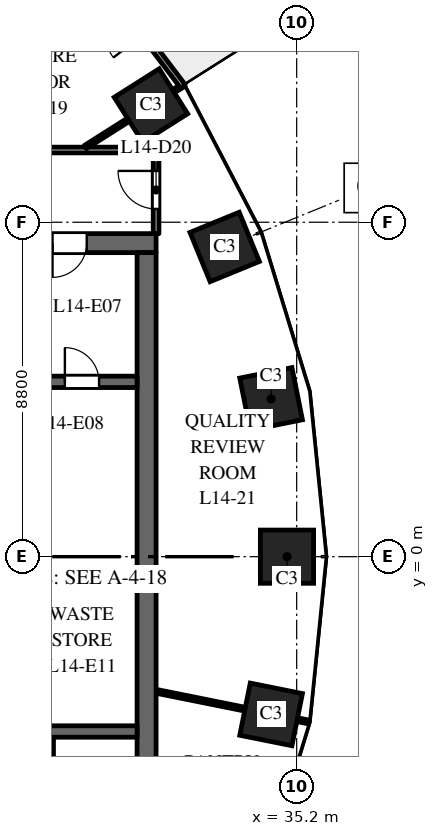
"""IFC4 building model, lengths in metres.
Left out: names, types, materials, properties, quantities, classifications, styles, units other than length and angle.
Written with IfcOpenShell. Run it as: python <this file> out.ifc"""

import sys

from ifc_helpers import new_model, si_unit, direction, frame, frame_2d, origin, origin_2d, place, context, subcontext, project, spatial, rectangle, extrude, element, fill, save


model = new_model("IFC4")
c1 = context("Model", 3, precision=1e-05, world=origin(), true_north=direction((0.0, 1.0)))
c2 = subcontext(c1, "Body", "Model", "MODEL_VIEW")
j1 = project(units=[si_unit("LENGTHUNIT", "METRE"), si_unit("PLANEANGLEUNIT", "RADIAN")], contexts=[c1])
p1 = place(None, origin())
s1 = spatial("IfcSite", under=j1, at=p1, CompositionType="ELEMENT")
p2 = place(p1, origin())
s2 = spatial("IfcBuilding", under=s1, at=p2, CompositionType="ELEMENT")
p3 = place(p2, frame((0.0, 0.0, 66.5)))
s3 = spatial("IfcBuildingStorey", under=s2, at=p3, CompositionType="ELEMENT", Elevation=66.5)
for number, where, z_axis, x_axis in (
    (1, (34.945, 0.0, 0.0), (0.0, 0.0, 1.0), (0.0, 1.0, 0.0)),
    (2, (34.527, 4.151, 0.0), (0.0, 0.0, 1.0), (-0.197, 0.98, 0.0)),
    (3, (33.305, 8.149, 0.0), (0.0, 0.0, 1.0), (-0.379, 0.925, 0.0)),
    (4, (31.365, 11.871, 0.0), (0.0, 0.0, 1.0), (-0.535, 0.845, 0.0)),
    (5, (34.527, -4.151, 0.0), (0.0, 0.0, 1.0), (0.197, 0.98, 0.0)),
):
    element("IfcColumn", number, at=place(p3, frame(where, z_axis=z_axis, x_axis=x_axis)), inside=s3, PredefinedType="COLUMN", context=c2, shape_type="SweptSolid", body=[
        extrude(rectangle(XDim=1.4, YDim=1.4, at=origin_2d()), origin(), (0.0, 0.0, 1.0), 4.0),
    ])
p4 = place(p3, frame((16.5, 8.25, 0.0), z_axis=(0.0, 0.0, 1.0), x_axis=(1.0, 0.0, 0.0)))
e6 = element("IfcWall", 6, at=p4, inside=s3, PredefinedType="SHEAR", context=c2, shape_type="SweptSolid", body=[
    extrude(rectangle(XDim=15.0, YDim=0.5, at=frame_2d((7.5, 0.0))), origin(), (0.0, 0.0, 1.0), 3.7),
])
p5 = place(p4, frame((6.9, 0.0, 0.0)))
e7 = element("IfcOpeningElement", 7, at=p5, cuts=e6, PredefinedType="OPENING", context=c2, shape_type="SweptSolid", body=[
    extrude(rectangle(XDim=1.2, YDim=2.1, at=frame_2d((0.6, 1.05))), frame((0.0, 0.26, 0.0), z_axis=(0.0, -1.0, 0.0), x_axis=(1.0, 0.0, 0.0)), (0.0, 0.0, 1.0), 0.52),
])
p6 = place(p4, frame((12.275, 0.0, 0.0)))
e8 = element("IfcOpeningElement", 8, at=p6, cuts=e6, PredefinedType="OPENING", context=c2, shape_type="SweptSolid", body=[
    extrude(rectangle(XDim=0.9, YDim=2.1, at=frame_2d((0.45, 1.05))), frame((0.0, 0.26, 0.0), z_axis=(0.0, -1.0, 0.0), x_axis=(1.0, 0.0, 0.0)), (0.0, 0.0, 1.0), 0.52),
])
p7 = place(p3, frame((31.25, -8.0, 0.0), z_axis=(0.0, 0.0, 1.0), x_axis=(0.0, 1.0, 0.0)))
e9 = element("IfcWall", 9, at=p7, inside=s3, PredefinedType="SHEAR", context=c2, shape_type="SweptSolid", body=[
    extrude(rectangle(XDim=16.0, YDim=0.5, at=frame_2d((8.0, 0.0))), origin(), (0.0, 0.0, 1.0), 3.7),
])
p8 = place(p3, frame((24.9, 4.6, 0.0), z_axis=(0.0, 0.0, 1.0), x_axis=(1.0, 0.0, 0.0)))
e10 = element("IfcWall", 10, at=p8, inside=s3, PredefinedType="SHEAR", context=c2, shape_type="SweptSolid", body=[
    extrude(rectangle(XDim=6.1, YDim=0.3, at=frame_2d((3.05, 0.0))), origin(), (0.0, 0.0, 1.0), 3.7),
])
p9 = place(p8, frame((4.2, 0.0, 0.0)))
e11 = element("IfcOpeningElement", 11, at=p9, cuts=e10, PredefinedType="OPENING", context=c2, shape_type="SweptSolid", body=[
    extrude(rectangle(XDim=0.9, YDim=2.1, at=frame_2d((0.45, 1.05))), frame((0.0, 0.16, 0.0), z_axis=(0.0, -1.0, 0.0), x_axis=(1.0, 0.0, 0.0)), (0.0, 0.0, 1.0), 0.32),
])
p10 = place(p3, frame((28.7, -8.0, 0.0), z_axis=(0.0, 0.0, 1.0), x_axis=(0.0, 1.0, 0.0)))
e12 = element("IfcWall", 12, at=p10, inside=s3, PredefinedType="PARTITIONING", context=c2, shape_type="SweptSolid", body=[
    extrude(rectangle(XDim=3.25, YDim=0.2, at=frame_2d((1.625, 0.0))), origin(), (0.0, 0.0, 1.0), 3.7),
])
p11 = place(p3, frame((24.9, -4.6, 0.0), z_axis=(0.0, 0.0, 1.0), x_axis=(1.0, 0.0, 0.0)))
e13 = element("IfcWall", 13, at=p11, inside=s3, PredefinedType="SHEAR", context=c2, shape_type="SweptSolid", body=[
    extrude(rectangle(XDim=6.1, YDim=0.3, at=frame_2d((3.05, 0.0))), origin(), (0.0, 0.0, 1.0), 3.7),
])
p12 = place(p3, frame((32.208, 12.374, 0.0), z_axis=(0.0, 0.0, 1.0), x_axis=(-0.604045763106, 0.796949632081, 0.0)))
e14 = element("IfcWall", 14, at=p12, inside=s3, PredefinedType="STANDARD", context=c2, shape_type="SweptSolid", body=[
    extrude(rectangle(XDim=4.423, YDim=0.15, at=frame_2d((2.212, 0.0))), origin(), (0.0, 0.0, 1.0), 3.7),
])
p13 = place(p12, frame((1.712, 0.0, 0.0)))
e15 = element("IfcOpeningElement", 15, at=p13, cuts=e14, PredefinedType="OPENING", context=c2, shape_type="SweptSolid", body=[
    extrude(rectangle(XDim=1.0, YDim=2.4, at=frame_2d((0.5, 1.2))), frame((0.0, 0.085, 0.0), z_axis=(0.0, -1.0, 0.0), x_axis=(1.0, 0.0, 0.0)), (0.0, 0.0, 1.0), 0.17),
])
p14 = place(p3, frame((21.32, 10.7, 0.0), z_axis=(0.0, 0.0, 1.0), x_axis=(1.0, 0.0, 0.0)))
e16 = element("IfcWall", 16, at=p14, inside=s3, PredefinedType="PARTITIONING", context=c2, shape_type="SweptSolid", body=[
    extrude(rectangle(XDim=10.18, YDim=0.15, at=frame_2d((5.09, 0.0))), origin(), (0.0, 0.0, 1.0), 2.85),
])
p15 = place(p14, frame((3.551, 0.0, 0.0)))
e17 = element("IfcOpeningElement", 17, at=p15, cuts=e16, PredefinedType="OPENING", context=c2, shape_type="SweptSolid", body=[
    extrude(rectangle(XDim=1.0, YDim=2.1, at=frame_2d((0.5, 1.05))), frame((0.0, 0.085, 0.0), z_axis=(0.0, -1.0, 0.0), x_axis=(1.0, 0.0, 0.0)), (0.0, 0.0, 1.0), 0.17),
])
p16 = place(p3, frame((29.637, 10.777, 0.0), z_axis=(0.0, 0.0, 1.0), x_axis=(0.844810627195, 0.535065420467, 0.0)))
e18 = element("IfcWall", 18, at=p16, inside=s3, PredefinedType="PARTITIONING", context=c2, shape_type="SweptSolid", body=[
    extrude(rectangle(XDim=3.048, YDim=0.1, at=frame_2d((1.524, 0.0))), origin(), (0.0, 0.0, 1.0), 2.85),
])
p17 = place(p3, frame((31.5, -3.542, 0.0), z_axis=(0.0, 0.0, 1.0), x_axis=(0.980357474535, -0.197228857227, 0.0)))
e19 = element("IfcWall", 19, at=p17, inside=s3, PredefinedType="PARTITIONING", context=c2, shape_type="SweptSolid", body=[
    extrude(rectangle(XDim=4.092, YDim=0.1, at=frame_2d((2.046, 0.0))), origin(), (0.0, 0.0, 1.0), 2.85),
])
p18 = place(p3, frame((31.5, 8.5, 0.0), z_axis=(0.0, 0.0, 1.0), x_axis=(0.0, 1.0, 0.0)))
e20 = element("IfcWall", 20, at=p18, inside=s3, PredefinedType="PARTITIONING", context=c2, shape_type="SweptSolid", body=[
    extrude(rectangle(XDim=2.2, YDim=0.15, at=frame_2d((1.1, 0.0))), origin(), (0.0, 0.0, 1.0), 2.85),
])
p19 = place(p18, frame((0.65, 0.0, 0.0)))
e21 = element("IfcOpeningElement", 21, at=p19, cuts=e20, PredefinedType="OPENING", context=c2, shape_type="SweptSolid", body=[
    extrude(rectangle(XDim=1.0, YDim=2.1, at=frame_2d((0.5, 1.05))), frame((0.0, 0.085, 0.0), z_axis=(0.0, -1.0, 0.0), x_axis=(1.0, 0.0, 0.0)), (0.0, 0.0, 1.0), 0.17),
])
p20 = place(p6, origin())
e22 = element("IfcDoor", 22, at=p20, inside=s3, OperationType="SINGLE_SWING_LEFT", PredefinedType="DOOR", context=c2, shape_type="SweptSolid", body=[
    extrude(rectangle(XDim=0.9, YDim=2.1, at=frame_2d((0.45, 1.05))), frame((0.0, 0.025, 0.0), z_axis=(0.0, -1.0, 0.0), x_axis=(1.0, 0.0, 0.0)), (0.0, 0.0, 1.0), 0.05),
])
fill(e8, e22)
p21 = place(p9, origin())
e23 = element("IfcDoor", 23, at=p21, inside=s3, OperationType="SINGLE_SWING_RIGHT", PredefinedType="DOOR", context=c2, shape_type="SweptSolid", body=[
    extrude(rectangle(XDim=0.9, YDim=2.1, at=frame_2d((0.45, 1.05))), frame((0.0, 0.025, 0.0), z_axis=(0.0, -1.0, 0.0), x_axis=(1.0, 0.0, 0.0)), (0.0, 0.0, 1.0), 0.05),
])
fill(e11, e23)
p22 = place(p19, origin())
e24 = element("IfcDoor", 24, at=p22, inside=s3, OperationType="SINGLE_SWING_RIGHT", PredefinedType="DOOR", context=c2, shape_type="SweptSolid", body=[
    extrude(rectangle(XDim=1.0, YDim=2.1, at=frame_2d((0.5, 1.05))), frame((0.0, 0.025, 0.0), z_axis=(0.0, -1.0, 0.0), x_axis=(1.0, 0.0, 0.0)), (0.0, 0.0, 1.0), 0.05),
])
fill(e21, e24)
save(model, sys.argv[1])
